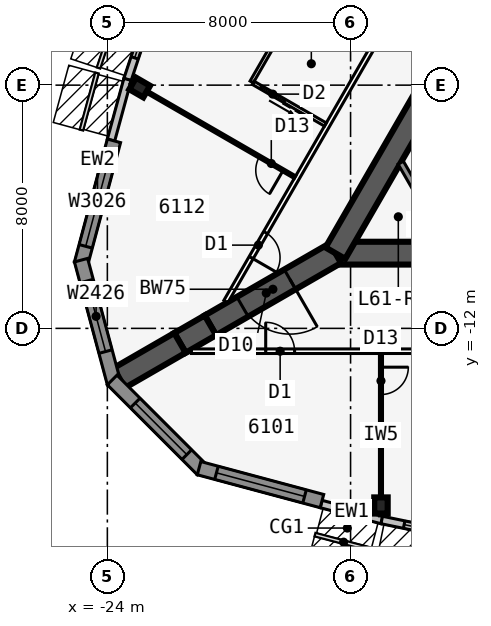
"""IFC4 building model, lengths in metres.
Left out: names, types, materials, properties, quantities, classifications, styles, units other than length and angle.
Written with IfcOpenShell. Run it as: python <this file> out.ifc"""

import sys

from ifc_helpers import new_model, si_unit, direction, frame, frame_2d, origin, origin_2d, place, context, subcontext, project, spatial, polyline, rectangle, i_section, outline, extrude, element, fill, save


model = new_model("IFC4")
c1 = context("Model", 3, precision=1e-05, world=origin(), true_north=direction((0.0, 1.0)))
c2 = subcontext(c1, "Body", "Model", "MODEL_VIEW")
j1 = project(units=[si_unit("LENGTHUNIT", "METRE"), si_unit("PLANEANGLEUNIT", "RADIAN")], contexts=[c1])
p1 = place(None, origin())
s1 = spatial("IfcSite", under=j1, at=p1, CompositionType="ELEMENT")
p2 = place(p1, origin())
s2 = spatial("IfcBuilding", under=s1, at=p2, CompositionType="ELEMENT")
p3 = place(p2, frame((0.0, 0.0, 229.7)))
s3 = spatial("IfcBuildingStorey", under=s2, at=p3, CompositionType="ELEMENT", Elevation=229.7)
p4 = place(p3, frame((-16.5, -9.526, 0.0), z_axis=(0.0, 0.0, 1.0), x_axis=(1.0, 0.0, 0.0)))
e1 = element("IfcWall", 1, at=p4, inside=s3, PredefinedType="SHEAR", context=c2, shape_type="SweptSolid", body=[
    extrude(rectangle(XDim=33.0, YDim=0.75, at=frame_2d((16.5, 0.0))), origin(), (0.0, 0.0, 1.0), 3.6),
])
p5 = place(p4, frame((14.05, 0.0, 0.0)))
e2 = element("IfcOpeningElement", 2, at=p5, cuts=e1, PredefinedType="OPENING", context=c2, shape_type="SweptSolid", body=[
    extrude(rectangle(XDim=1.8, YDim=2.13, at=frame_2d((0.9, 1.065))), frame((0.0, 0.385, 0.0), z_axis=(0.0, -1.0, 0.0), x_axis=(1.0, 0.0, 0.0)), (0.0, 0.0, 1.0), 0.77),
])
p6 = place(p3, frame((0.0, 19.052, 0.0), z_axis=(0.0, 0.0, 1.0), x_axis=(-0.499999749417, -0.866025548458, 0.0)))
e3 = element("IfcWall", 3, at=p6, inside=s3, PredefinedType="SHEAR", context=c2, shape_type="SweptSolid", body=[
    extrude(rectangle(XDim=33.0, YDim=0.75, at=frame_2d((16.5, 0.0))), origin(), (0.0, 0.0, 1.0), 3.6),
])
p7 = place(p6, frame((14.15, 0.0, 0.0)))
e4 = element("IfcOpeningElement", 4, at=p7, cuts=e3, PredefinedType="OPENING", context=c2, shape_type="SweptSolid", body=[
    extrude(rectangle(XDim=1.8, YDim=2.13, at=frame_2d((0.9, 1.065))), frame((0.0, 0.385, 0.0), z_axis=(0.0, -1.0, 0.0), x_axis=(1.0, 0.0, 0.0)), (0.0, 0.0, 1.0), 0.77),
])
p8 = place(p6, frame((12.6, 0.0, 0.0)))
e5 = element("IfcOpeningElement", 5, at=p8, cuts=e3, PredefinedType="OPENING", context=c2, shape_type="SweptSolid", body=[
    extrude(rectangle(XDim=1.0, YDim=2.13, at=frame_2d((0.5, 1.065))), frame((0.0, 0.385, 0.0), z_axis=(0.0, -1.0, 0.0), x_axis=(1.0, 0.0, 0.0)), (0.0, 0.0, 1.0), 0.77),
])
p9 = place(p3, frame((-16.5, -9.526, 0.0), z_axis=(0.0, 0.0, 1.0), x_axis=(-0.866031398331, -0.499989616998, 0.0)))
e6 = element("IfcWall", 6, at=p9, inside=s3, PredefinedType="SHEAR", context=c2, shape_type="SweptSolid", body=[
    extrude(rectangle(XDim=4.746, YDim=0.75, at=frame_2d((2.373, 0.0))), origin(), (0.0, 0.0, 1.0), 3.6),
])
p10 = place(p9, frame((1.725, 0.0, 0.0)))
e7 = element("IfcOpeningElement", 7, at=p10, cuts=e6, PredefinedType="OPENING", context=c2, shape_type="SweptSolid", body=[
    extrude(rectangle(XDim=1.8, YDim=2.13, at=frame_2d((0.9, 1.065))), frame((0.0, 0.385, 0.0), z_axis=(0.0, -1.0, 0.0), x_axis=(1.0, 0.0, 0.0)), (0.0, 0.0, 1.0), 0.77),
])
p11 = place(p3, frame((-20.61, -11.899, 0.0), z_axis=(0.0, 0.0, 1.0), x_axis=(-0.866009537788, -0.500027479704, 0.0)))
e8 = element("IfcWall", 8, at=p11, inside=s3, PredefinedType="SHEAR", context=c2, shape_type="SweptSolid", body=[
    extrude(rectangle(XDim=1.155, YDim=0.75, at=frame_2d((0.577, 0.0))), origin(), (0.0, 0.0, 1.0), 3.6),
])
p12 = place(p3, frame((-21.61, -12.477, 0.0), z_axis=(0.0, 0.0, 1.0), x_axis=(-0.866055313784, -0.499948190782, 0.0)))
e9 = element("IfcWall", 9, at=p12, inside=s3, PredefinedType="SHEAR", context=c2, shape_type="SweptSolid", body=[
    extrude(rectangle(XDim=2.309, YDim=0.75, at=frame_2d((1.155, 0.0))), origin(), (0.0, 0.0, 1.0), 3.6),
])
for number, where, z_axis, x_axis in (
    (10, (-15.0, -17.825, 0.0), (0.0, 0.0, 1.0), (1.0, 0.0, 0.0)),
    (11, (-22.937, -4.078, 0.0), (0.0, 0.0, 1.0), (-0.5, -0.866, 0.0)),
):
    element("IfcColumn", number, at=place(p3, frame(where, z_axis=z_axis, x_axis=x_axis)), inside=s3, PredefinedType="COLUMN", context=c2, shape_type="SweptSolid", body=[
        extrude(i_section(OverallWidth=0.442, OverallDepth=0.531, WebThickness=0.066, FlangeThickness=0.106, at=origin_2d()), origin(), (0.0, 0.0, 1.0), 3.6),
    ])
p13 = place(p3, frame((-16.968, -17.777, 0.0), z_axis=(0.0, 0.0, 1.0), x_axis=(0.967010286052, -0.254737328772, 0.0)))
e12 = element("IfcWall", 12, at=p13, inside=s3, PredefinedType="STANDARD", context=c2, shape_type="SweptSolid", body=[
    extrude(rectangle(XDim=2.068, YDim=0.25, at=frame_2d((1.034, 0.0))), origin(), (0.0, 0.0, 1.0), 3.35),
])
p14 = place(p3, frame((-14.975, -18.302, 0.0), z_axis=(0.0, 0.0, 1.0), x_axis=(0.979461488189, -0.201631329795, 0.0)))
e13 = element("IfcWall", 13, at=p14, inside=s3, PredefinedType="STANDARD", context=c2, shape_type="SweptSolid", body=[
    extrude(rectangle(XDim=5.105, YDim=0.25, at=frame_2d((2.552, 0.0))), origin(), (0.0, 0.0, 1.0), 3.35),
])
p15 = place(p14, frame((0.752, 0.0, 0.45)))
e14 = element("IfcOpeningElement", 14, at=p15, cuts=e13, PredefinedType="OPENING", context=c2, shape_type="SweptSolid", body=[
    extrude(rectangle(XDim=3.6, YDim=2.6, at=frame_2d((1.8, 1.3))), frame((0.0, 0.135, 0.0), z_axis=(0.0, -1.0, 0.0), x_axis=(1.0, 0.0, 0.0)), (0.0, 0.0, 1.0), 0.27),
])
p16 = place(p3, frame((-21.729, 1.028, 0.0), z_axis=(0.0, 0.0, 1.0), x_axis=(-0.315108478109, -0.949055660656, 0.0)))
e15 = element("IfcWall", 15, at=p16, inside=s3, PredefinedType="STANDARD", context=c2, shape_type="SweptSolid", body=[
    extrude(rectangle(XDim=5.105, YDim=0.25, at=frame_2d((2.552, 0.0))), origin(), (0.0, 0.0, 1.0), 3.35),
])
p17 = place(p16, frame((0.752, 0.0, 0.45)))
e16 = element("IfcOpeningElement", 16, at=p17, cuts=e15, PredefinedType="OPENING", context=c2, shape_type="SweptSolid", body=[
    extrude(rectangle(XDim=3.6, YDim=2.6, at=frame_2d((1.8, 1.3))), frame((0.0, 0.135, 0.0), z_axis=(0.0, -1.0, 0.0), x_axis=(1.0, 0.0, 0.0)), (0.0, 0.0, 1.0), 0.27),
])
p18 = place(p3, frame((-23.336, -3.811, 0.0), z_axis=(0.0, 0.0, 1.0), x_axis=(-0.262867703986, -0.964831887015, 0.0)))
e17 = element("IfcWall", 17, at=p18, inside=s3, PredefinedType="STANDARD", context=c2, shape_type="SweptSolid", body=[
    extrude(rectangle(XDim=2.068, YDim=0.25, at=frame_2d((1.034, 0.0))), origin(), (0.0, 0.0, 1.0), 3.35),
])
p19 = place(p3, frame((-23.783, -5.832, 0.0), z_axis=(0.0, 0.0, 1.0), x_axis=(-0.258784695888, -0.965935029479, 0.0)))
e18 = element("IfcWall", 18, at=p19, inside=s3, PredefinedType="SOLIDWALL", context=c2, shape_type="SweptSolid", body=[
    extrude(rectangle(XDim=4.184, YDim=0.45, at=frame_2d((2.092, 0.0))), origin(), (0.0, 0.0, 1.0), 3.35),
])
p20 = place(p19, frame((0.592, 0.0, 0.45)))
e19 = element("IfcOpeningElement", 19, at=p20, cuts=e18, PredefinedType="OPENING", context=c2, shape_type="SweptSolid", body=[
    extrude(rectangle(XDim=3.0, YDim=2.6, at=frame_2d((1.5, 1.3))), frame((0.0, 0.235, 0.0), z_axis=(0.0, -1.0, 0.0), x_axis=(1.0, 0.0, 0.0)), (0.0, 0.0, 1.0), 0.47),
])
p21 = place(p3, frame((-24.865, -9.757, 0.0), z_axis=(0.0, 0.0, 1.0), x_axis=(0.258799282522, -0.96593112144, 0.0)))
e20 = element("IfcWall", 20, at=p21, inside=s3, PredefinedType="SOLIDWALL", context=c2, shape_type="SweptSolid", body=[
    extrude(outline(polyline([(4.184, 0.225), (4.125, 0.225), (3.705, 0.113), (3.675, 0.225), (0.0, 0.225), (0.0, -0.225), (4.184, -0.225), (4.184, 0.225)])), origin(), (0.0, 0.0, 1.0), 3.35),
])
p22 = place(p21, frame((0.713, 0.0, 0.45)))
e21 = element("IfcOpeningElement", 21, at=p22, cuts=e20, PredefinedType="OPENING", context=c2, shape_type="SweptSolid", body=[
    extrude(rectangle(XDim=2.4, YDim=2.6, at=frame_2d((1.2, 1.3))), frame((0.0, 0.235, 0.0), z_axis=(0.0, -1.0, 0.0), x_axis=(1.0, 0.0, 0.0)), (0.0, 0.0, 1.0), 0.47),
])
p23 = place(p3, frame((-23.841, -13.697, 0.0), z_axis=(0.0, 0.0, 1.0), x_axis=(0.707077605902, -0.707135955267, 0.0)))
e22 = element("IfcWall", 22, at=p23, inside=s3, PredefinedType="SOLIDWALL", context=c2, shape_type="SweptSolid", body=[
    extrude(outline(polyline([(4.184, 0.225), (0.509, 0.225), (0.479, 0.113), (0.059, 0.225), (0.0, 0.225), (0.0, -0.225), (4.184, -0.225), (4.184, 0.225)])), origin(), (0.0, 0.0, 1.0), 3.35),
])
p24 = place(p23, frame((1.071, 0.0, 0.45)))
e23 = element("IfcOpeningElement", 23, at=p24, cuts=e22, PredefinedType="OPENING", context=c2, shape_type="SweptSolid", body=[
    extrude(rectangle(XDim=2.4, YDim=2.6, at=frame_2d((1.2, 1.3))), frame((0.0, 0.235, 0.0), z_axis=(0.0, -1.0, 0.0), x_axis=(1.0, 0.0, 0.0)), (0.0, 0.0, 1.0), 0.47),
])
p25 = place(p3, frame((-20.983, -16.598, 0.0), z_axis=(0.0, 0.0, 1.0), x_axis=(0.965920442324, -0.258839137498, 0.0)))
e24 = element("IfcWall", 24, at=p25, inside=s3, PredefinedType="SOLIDWALL", context=c2, shape_type="SweptSolid", body=[
    extrude(rectangle(XDim=4.184, YDim=0.45, at=frame_2d((2.092, 0.0))), origin(), (0.0, 0.0, 1.0), 3.35),
])
p26 = place(p25, frame((0.592, 0.0, 0.45)))
e25 = element("IfcOpeningElement", 25, at=p26, cuts=e24, PredefinedType="OPENING", context=c2, shape_type="SweptSolid", body=[
    extrude(rectangle(XDim=3.0, YDim=2.6, at=frame_2d((1.5, 1.3))), frame((0.0, 0.235, 0.0), z_axis=(0.0, -1.0, 0.0), x_axis=(1.0, 0.0, 0.0)), (0.0, 0.0, 1.0), 0.47),
])
p27 = place(p3, frame((-21.236, -12.751, 0.0), z_axis=(0.0, 0.0, 1.0), x_axis=(1.0, 0.0, 0.0)))
e26 = element("IfcWall", 26, at=p27, inside=s3, PredefinedType="PARTITIONING", context=c2, shape_type="SweptSolid", body=[
    extrude(rectangle(XDim=42.472, YDim=0.15, at=frame_2d((21.236, 0.0))), origin(), (0.0, 0.0, 1.0), 3.35),
])
p28 = place(p27, frame((2.444, 0.0, 0.0)))
e27 = element("IfcOpeningElement", 27, at=p28, cuts=e26, PredefinedType="OPENING", context=c2, shape_type="SweptSolid", body=[
    extrude(rectangle(XDim=0.95, YDim=2.13, at=frame_2d((0.475, 1.065))), frame((0.0, 0.085, 0.0), z_axis=(0.0, -1.0, 0.0), x_axis=(1.0, 0.0, 0.0)), (0.0, 0.0, 1.0), 0.17),
])
p29 = place(p27, frame((13.261, 0.0, 0.0)))
e28 = element("IfcOpeningElement", 28, at=p29, cuts=e26, PredefinedType="OPENING", context=c2, shape_type="SweptSolid", body=[
    extrude(rectangle(XDim=0.95, YDim=2.13, at=frame_2d((0.475, 1.065))), frame((0.0, 0.085, 0.0), z_axis=(0.0, -1.0, 0.0), x_axis=(1.0, 0.0, 0.0)), (0.0, 0.0, 1.0), 0.17),
])
p30 = place(p27, frame((23.236, 0.0, 0.0)))
e29 = element("IfcOpeningElement", 29, at=p30, cuts=e26, PredefinedType="OPENING", context=c2, shape_type="SweptSolid", body=[
    extrude(rectangle(XDim=1.0, YDim=2.13, at=frame_2d((0.5, 1.065))), frame((0.0, 0.085, 0.0), z_axis=(0.0, -1.0, 0.0), x_axis=(1.0, 0.0, 0.0)), (0.0, 0.0, 1.0), 0.17),
])
p31 = place(p27, frame((29.461, 0.0, 0.0)))
e30 = element("IfcOpeningElement", 30, at=p31, cuts=e26, PredefinedType="OPENING", context=c2, shape_type="SweptSolid", body=[
    extrude(rectangle(XDim=0.95, YDim=2.13, at=frame_2d((0.475, 1.065))), frame((0.0, 0.085, 0.0), z_axis=(0.0, -1.0, 0.0), x_axis=(1.0, 0.0, 0.0)), (0.0, 0.0, 1.0), 0.17),
])
p32 = place(p27, frame((39.077, 0.0, 0.0)))
e31 = element("IfcOpeningElement", 31, at=p32, cuts=e26, PredefinedType="OPENING", context=c2, shape_type="SweptSolid", body=[
    extrude(rectangle(XDim=0.95, YDim=2.13, at=frame_2d((0.475, 1.065))), frame((0.0, 0.085, 0.0), z_axis=(0.0, -1.0, 0.0), x_axis=(1.0, 0.0, 0.0)), (0.0, 0.0, 1.0), 0.17),
])
p33 = place(p3, frame((-15.0, -12.826, 0.0), z_axis=(0.0, 0.0, 1.0), x_axis=(0.0, -1.0, 0.0)))
e32 = element("IfcWall", 32, at=p33, inside=s3, PredefinedType="PARTITIONING", context=c2, shape_type="SweptSolid", body=[
    extrude(rectangle(XDim=5.34, YDim=0.1, at=frame_2d((2.67, 0.0))), origin(), (0.0, 0.0, 1.0), 2.25),
])
p34 = place(p33, frame((0.45, 0.0, 0.0)))
e33 = element("IfcOpeningElement", 33, at=p34, cuts=e32, PredefinedType="OPENING", context=c2, shape_type="SweptSolid", body=[
    extrude(rectangle(XDim=0.9, YDim=2.13, at=frame_2d((0.45, 1.065))), frame((0.0, 0.06, 0.0), z_axis=(0.0, -1.0, 0.0), x_axis=(1.0, 0.0, 0.0)), (0.0, 0.0, 1.0), 0.12),
])
p35 = place(p3, frame((-0.425, 22.966, 0.0), z_axis=(0.0, 0.0, 1.0), x_axis=(-0.500000265775, -0.866025250339, 0.0)))
e34 = element("IfcWall", 34, at=p35, inside=s3, PredefinedType="PARTITIONING", context=c2, shape_type="SweptSolid", body=[
    extrude(rectangle(XDim=39.354, YDim=0.15, at=frame_2d((19.677, 0.0))), origin(), (0.0, 0.0, 1.0), 3.35),
])
p36 = place(p35, frame((1.665, 0.0, 0.0)))
e35 = element("IfcOpeningElement", 35, at=p36, cuts=e34, PredefinedType="OPENING", context=c2, shape_type="SweptSolid", body=[
    extrude(rectangle(XDim=0.95, YDim=2.13, at=frame_2d((0.475, 1.065))), frame((0.0, 0.085, 0.0), z_axis=(0.0, -1.0, 0.0), x_axis=(1.0, 0.0, 0.0)), (0.0, 0.0, 1.0), 0.17),
])
p37 = place(p35, frame((11.702, 0.0, 0.0)))
e36 = element("IfcOpeningElement", 36, at=p37, cuts=e34, PredefinedType="OPENING", context=c2, shape_type="SweptSolid", body=[
    extrude(rectangle(XDim=0.95, YDim=2.13, at=frame_2d((0.475, 1.065))), frame((0.0, 0.085, 0.0), z_axis=(0.0, -1.0, 0.0), x_axis=(1.0, 0.0, 0.0)), (0.0, 0.0, 1.0), 0.17),
])
p38 = place(p35, frame((21.702, 0.0, 0.0)))
e37 = element("IfcOpeningElement", 37, at=p38, cuts=e34, PredefinedType="OPENING", context=c2, shape_type="SweptSolid", body=[
    extrude(rectangle(XDim=0.95, YDim=2.13, at=frame_2d((0.475, 1.065))), frame((0.0, 0.085, 0.0), z_axis=(0.0, -1.0, 0.0), x_axis=(1.0, 0.0, 0.0)), (0.0, 0.0, 1.0), 0.17),
])
p39 = place(p35, frame((36.739, 0.0, 0.0)))
e38 = element("IfcOpeningElement", 38, at=p39, cuts=e34, PredefinedType="OPENING", context=c2, shape_type="SweptSolid", body=[
    extrude(rectangle(XDim=0.95, YDim=2.13, at=frame_2d((0.475, 1.065))), frame((0.0, 0.085, 0.0), z_axis=(0.0, -1.0, 0.0), x_axis=(1.0, 0.0, 0.0)), (0.0, 0.0, 1.0), 0.17),
])
p40 = place(p3, frame((-17.829, -7.027, 0.0), z_axis=(0.0, 0.0, 1.0), x_axis=(-0.866026604282, 0.499997920671, 0.0)))
e39 = element("IfcWall", 39, at=p40, inside=s3, PredefinedType="PARTITIONING", context=c2, shape_type="SweptSolid", body=[
    extrude(rectangle(XDim=6.24, YDim=0.1, at=frame_2d((3.12, 0.0))), origin(), (0.0, 0.0, 1.0), 2.25),
])
p41 = place(p40, frame((0.45, 0.0, 0.0)))
e40 = element("IfcOpeningElement", 40, at=p41, cuts=e39, PredefinedType="OPENING", context=c2, shape_type="SweptSolid", body=[
    extrude(rectangle(XDim=0.9, YDim=2.13, at=frame_2d((0.45, 1.065))), frame((0.0, 0.06, 0.0), z_axis=(0.0, -1.0, 0.0), x_axis=(1.0, 0.0, 0.0)), (0.0, 0.0, 1.0), 0.12),
])
p42 = place(p3, frame((-17.753, -1.297, 0.0), z_axis=(0.0, 0.0, 1.0), x_axis=(-0.499990139034, -0.866031096941, 0.0)))
e41 = element("IfcWall", 41, at=p42, inside=s3, PredefinedType="PLUMBINGWALL", context=c2, shape_type="SweptSolid", body=[
    extrude(rectangle(XDim=3.0, YDim=0.12, at=frame_2d((1.5, 0.0))), origin(), (0.0, 0.0, 1.0), 3.35),
])
p43 = place(p3, frame((-16.829, -5.295, 0.0), z_axis=(0.0, 0.0, 1.0), x_axis=(-0.866035715982, 0.499982138324, 0.0)))
e42 = element("IfcWall", 42, at=p43, inside=s3, PredefinedType="PLUMBINGWALL", context=c2, shape_type="SweptSolid", body=[
    extrude(rectangle(XDim=2.74, YDim=0.12, at=frame_2d((1.37, 0.0))), origin(), (0.0, 0.0, 1.0), 3.35),
])
p44 = place(p43, frame((1.55, 0.0, 0.0)))
e43 = element("IfcOpeningElement", 43, at=p44, cuts=e42, PredefinedType="OPENING", context=c2, shape_type="SweptSolid", body=[
    extrude(rectangle(XDim=0.9, YDim=2.13, at=frame_2d((0.45, 1.065))), frame((0.0, 0.07, 0.0), z_axis=(0.0, -1.0, 0.0), x_axis=(1.0, 0.0, 0.0)), (0.0, 0.0, 1.0), 0.14),
])
p45 = place(p3, frame((-12.848, -9.151, 0.0), z_axis=(0.0, 0.0, 1.0), x_axis=(-0.499952404951, 0.866052881055, 0.0)))
e44 = element("IfcWall", 44, at=p45, inside=s3, PredefinedType="SOLIDWALL", context=c2, shape_type="SweptSolid", body=[
    extrude(rectangle(XDim=3.002, YDim=0.2, at=frame_2d((1.501, 0.0))), origin(), (0.0, 0.0, 1.0), 3.35),
])
p46 = place(p15, origin())
e45 = element("IfcWindow", 45, at=p46, inside=s3, PartitioningType="SINGLE_PANEL", PredefinedType="WINDOW", context=c2, shape_type="SweptSolid", body=[
    extrude(rectangle(XDim=3.6, YDim=2.6, at=frame_2d((1.8, 1.3))), frame((0.0, 0.03, 0.0), z_axis=(0.0, -1.0, 0.0), x_axis=(1.0, 0.0, 0.0)), (0.0, 0.0, 1.0), 0.06),
])
fill(e14, e45)
p47 = place(p17, origin())
e46 = element("IfcWindow", 46, at=p47, inside=s3, PartitioningType="SINGLE_PANEL", PredefinedType="WINDOW", context=c2, shape_type="SweptSolid", body=[
    extrude(rectangle(XDim=3.6, YDim=2.6, at=frame_2d((1.8, 1.3))), frame((0.0, 0.03, 0.0), z_axis=(0.0, -1.0, 0.0), x_axis=(1.0, 0.0, 0.0)), (0.0, 0.0, 1.0), 0.06),
])
fill(e16, e46)
p48 = place(p20, origin())
e47 = element("IfcWindow", 47, at=p48, inside=s3, PartitioningType="SINGLE_PANEL", PredefinedType="WINDOW", context=c2, shape_type="SweptSolid", body=[
    extrude(rectangle(XDim=3.0, YDim=2.6, at=frame_2d((1.5, 1.3))), frame((0.0, 0.03, 0.0), z_axis=(0.0, -1.0, 0.0), x_axis=(1.0, 0.0, 0.0)), (0.0, 0.0, 1.0), 0.06),
])
fill(e19, e47)
p49 = place(p22, origin())
e48 = element("IfcWindow", 48, at=p49, inside=s3, PartitioningType="SINGLE_PANEL", PredefinedType="WINDOW", context=c2, shape_type="SweptSolid", body=[
    extrude(rectangle(XDim=2.4, YDim=2.6, at=frame_2d((1.2, 1.3))), frame((0.0, 0.03, 0.0), z_axis=(0.0, -1.0, 0.0), x_axis=(1.0, 0.0, 0.0)), (0.0, 0.0, 1.0), 0.06),
])
fill(e21, e48)
p50 = place(p24, origin())
e49 = element("IfcWindow", 49, at=p50, inside=s3, PartitioningType="SINGLE_PANEL", PredefinedType="WINDOW", context=c2, shape_type="SweptSolid", body=[
    extrude(rectangle(XDim=2.4, YDim=2.6, at=frame_2d((1.2, 1.3))), frame((0.0, 0.03, 0.0), z_axis=(0.0, -1.0, 0.0), x_axis=(1.0, 0.0, 0.0)), (0.0, 0.0, 1.0), 0.06),
])
fill(e23, e49)
p51 = place(p26, origin())
e50 = element("IfcWindow", 50, at=p51, inside=s3, PartitioningType="SINGLE_PANEL", PredefinedType="WINDOW", context=c2, shape_type="SweptSolid", body=[
    extrude(rectangle(XDim=3.0, YDim=2.6, at=frame_2d((1.5, 1.3))), frame((0.0, 0.03, 0.0), z_axis=(0.0, -1.0, 0.0), x_axis=(1.0, 0.0, 0.0)), (0.0, 0.0, 1.0), 0.06),
])
fill(e25, e50)
p52 = place(p34, origin())
e51 = element("IfcDoor", 51, at=p52, inside=s3, OperationType="SINGLE_SWING_LEFT", PredefinedType="DOOR", context=c2, shape_type="SweptSolid", body=[
    extrude(rectangle(XDim=0.9, YDim=2.13, at=frame_2d((0.45, 1.065))), frame((0.0, 0.025, 0.0), z_axis=(0.0, -1.0, 0.0), x_axis=(1.0, 0.0, 0.0)), (0.0, 0.0, 1.0), 0.05),
])
fill(e33, e51)
p53 = place(p28, origin())
e52 = element("IfcDoor", 52, at=p53, inside=s3, OperationType="SINGLE_SWING_LEFT", PredefinedType="DOOR", context=c2, shape_type="SweptSolid", body=[
    extrude(rectangle(XDim=0.95, YDim=2.13, at=frame_2d((0.475, 1.065))), frame((0.0, 0.025, 0.0), z_axis=(0.0, -1.0, 0.0), x_axis=(1.0, 0.0, 0.0)), (0.0, 0.0, 1.0), 0.05),
])
fill(e27, e52)
p54 = place(p41, origin())
e53 = element("IfcDoor", 53, at=p54, inside=s3, OperationType="SINGLE_SWING_LEFT", PredefinedType="DOOR", context=c2, shape_type="SweptSolid", body=[
    extrude(rectangle(XDim=0.9, YDim=2.13, at=frame_2d((0.45, 1.065))), frame((0.0, 0.025, 0.0), z_axis=(0.0, -1.0, 0.0), x_axis=(1.0, 0.0, 0.0)), (0.0, 0.0, 1.0), 0.05),
])
fill(e40, e53)
p55 = place(p44, origin())
e54 = element("IfcDoor", 54, at=p55, inside=s3, OperationType="SLIDING_TO_LEFT", PredefinedType="DOOR", context=c2, shape_type="SweptSolid", body=[
    extrude(rectangle(XDim=0.9, YDim=2.13, at=frame_2d((0.45, 1.065))), frame((0.0, 0.025, 0.0), z_axis=(0.0, -1.0, 0.0), x_axis=(1.0, 0.0, 0.0)), (0.0, 0.0, 1.0), 0.05),
])
fill(e43, e54)
p56 = place(p39, origin())
e55 = element("IfcDoor", 55, at=p56, inside=s3, OperationType="SINGLE_SWING_RIGHT", PredefinedType="DOOR", context=c2, shape_type="SweptSolid", body=[
    extrude(rectangle(XDim=0.95, YDim=2.13, at=frame_2d((0.475, 1.065))), frame((0.0, 0.025, 0.0), z_axis=(0.0, -1.0, 0.0), x_axis=(1.0, 0.0, 0.0)), (0.0, 0.0, 1.0), 0.05),
])
fill(e38, e55)
p57 = place(p10, origin())
e56 = element("IfcDoor", 56, at=p57, inside=s3, OperationType="DOUBLE_DOOR_DOUBLE_SWING", PredefinedType="DOOR", context=c2, shape_type="SweptSolid", body=[
    extrude(rectangle(XDim=1.8, YDim=2.13, at=frame_2d((0.9, 1.065))), frame((0.0, 0.025, 0.0), z_axis=(0.0, -1.0, 0.0), x_axis=(1.0, 0.0, 0.0)), (0.0, 0.0, 1.0), 0.05),
])
fill(e7, e56)
save(model, sys.argv[1])
